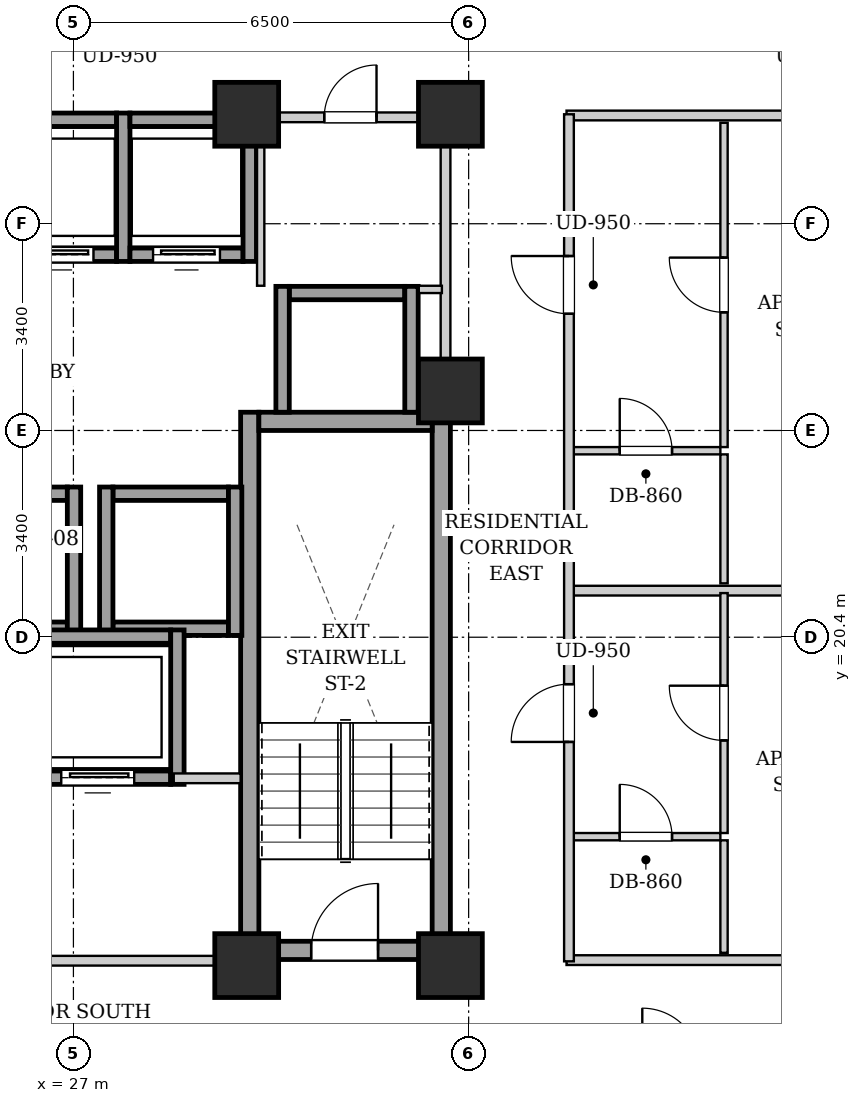
"""IFC4 building model, lengths in metres.
Left out: names, types, materials, properties, quantities, classifications, styles, units other than length and angle.
Written with IfcOpenShell. Run it as: python <this file> out.ifc"""

import sys

from ifc_helpers import new_model, si_unit, direction, frame, frame_2d, origin, origin_2d, place, context, subcontext, project, spatial, rectangle, extrude, element, fill, save


model = new_model("IFC4")
c1 = context("Model", 3, precision=1e-05, world=origin(), true_north=direction((0.0, 1.0)))
c2 = subcontext(c1, "Body", "Model", "MODEL_VIEW")
j1 = project(units=[si_unit("LENGTHUNIT", "METRE"), si_unit("PLANEANGLEUNIT", "RADIAN")], contexts=[c1])
p1 = place(None, origin())
s1 = spatial("IfcSite", under=j1, at=p1, CompositionType="ELEMENT")
p2 = place(p1, origin())
s2 = spatial("IfcBuilding", under=s1, at=p2, CompositionType="ELEMENT")
p3 = place(p2, frame((0.0, 0.0, 103.9)))
s3 = spatial("IfcBuildingStorey", under=s2, at=p3, CompositionType="ELEMENT", Elevation=103.9)
for number, where, z_axis, x_axis in (
    (1, (29.85, 15.0, 0.0), (0.0, 0.0, 1.0), (1.0, 0.0, 0.0)),
    (2, (33.2, 15.0, 0.0), (0.0, 0.0, 1.0), (1.0, 0.0, 0.0)),
    (3, (29.85, 29.0, 0.0), (0.0, 0.0, 1.0), (1.0, 0.0, 0.0)),
    (4, (33.2, 29.0, 0.0), (0.0, 0.0, 1.0), (1.0, 0.0, 0.0)),
    (5, (33.2, 24.45, 0.0), (0.0, 0.0, 1.0), (1.0, 0.0, 0.0)),
):
    element("IfcColumn", number, at=place(p3, frame(where, z_axis=z_axis, x_axis=x_axis)), inside=s3, PredefinedType="COLUMN", context=c2, shape_type="SweptSolid", body=[
        extrude(rectangle(XDim=1.05, YDim=1.05, at=origin_2d()), origin(), (0.0, 0.0, 1.0), 3.2),
    ])
for number, where, z_axis, x_axis in (
    (6, (29.9, 15.1, 0.0), (0.0, 0.0, 1.0), (0.0, 1.0, 0.0)),
    (7, (33.05, 15.1, 0.0), (0.0, 0.0, 1.0), (0.0, 1.0, 0.0)),
):
    element("IfcWall", number, at=place(p3, frame(where, z_axis=z_axis, x_axis=x_axis)), inside=s3, PredefinedType="SHEAR", context=c2, shape_type="SweptSolid", body=[
        extrude(rectangle(XDim=9.0, YDim=0.3, at=frame_2d((4.5, 0.0))), origin(), (0.0, 0.0, 1.0), 2.94),
    ])
p4 = place(p3, frame((30.05, 23.95, 0.0), z_axis=(0.0, 0.0, 1.0), x_axis=(1.0, 0.0, 0.0)))
e8 = element("IfcWall", 8, at=p4, inside=s3, PredefinedType="SHEAR", context=c2, shape_type="SweptSolid", body=[
    extrude(rectangle(XDim=2.85, YDim=0.3, at=frame_2d((1.425, 0.0))), origin(), (0.0, 0.0, 1.0), 2.94),
])
p5 = place(p3, frame((30.05, 15.25, 0.0), z_axis=(0.0, 0.0, 1.0), x_axis=(1.0, 0.0, 0.0)))
e9 = element("IfcWall", 9, at=p5, inside=s3, PredefinedType="SHEAR", context=c2, shape_type="SweptSolid", body=[
    extrude(rectangle(XDim=2.85, YDim=0.3, at=frame_2d((1.425, 0.0))), origin(), (0.0, 0.0, 1.0), 2.94),
])
p6 = place(p5, frame((0.86, 0.0, 0.0)))
e10 = element("IfcOpeningElement", 10, at=p6, cuts=e9, PredefinedType="OPENING", context=c2, shape_type="SweptSolid", body=[
    extrude(rectangle(XDim=1.1, YDim=2.05, at=frame_2d((0.55, 1.025))), frame((0.0, 0.16, 0.0), z_axis=(0.0, -1.0, 0.0), x_axis=(1.0, 0.0, 0.0)), (0.0, 0.0, 1.0), 0.32),
])
p7 = place(p3, frame((25.85, 26.69, 0.0), z_axis=(0.0, 0.0, 1.0), x_axis=(1.0, 0.0, 0.0)))
e11 = element("IfcWall", 11, at=p7, inside=s3, PredefinedType="SHEAR", context=c2, shape_type="SweptSolid", body=[
    extrude(rectangle(XDim=1.86, YDim=0.22, at=frame_2d((0.93, 0.0))), origin(), (0.0, 0.0, 1.0), 2.94),
])
p8 = place(p7, frame((0.38, 0.0, 0.0)))
e12 = element("IfcOpeningElement", 12, at=p8, cuts=e11, PredefinedType="OPENING", context=c2, shape_type="SweptSolid", body=[
    extrude(rectangle(XDim=1.1, YDim=2.15, at=frame_2d((0.55, 1.075))), frame((0.0, 0.12, 0.0), z_axis=(0.0, -1.0, 0.0), x_axis=(1.0, 0.0, 0.0)), (0.0, 0.0, 1.0), 0.24),
])
p9 = place(p3, frame((25.85, 28.91, 0.0), z_axis=(0.0, 0.0, 1.0), x_axis=(1.0, 0.0, 0.0)))
e13 = element("IfcWall", 13, at=p9, inside=s3, PredefinedType="SHEAR", context=c2, shape_type="SweptSolid", body=[
    extrude(rectangle(XDim=1.86, YDim=0.22, at=frame_2d((0.93, 0.0))), origin(), (0.0, 0.0, 1.0), 2.94),
])
p10 = place(p3, frame((27.82, 26.58, 0.0), z_axis=(0.0, 0.0, 1.0), x_axis=(0.0, 1.0, 0.0)))
e14 = element("IfcWall", 14, at=p10, inside=s3, PredefinedType="SHEAR", context=c2, shape_type="SweptSolid", body=[
    extrude(rectangle(XDim=2.44, YDim=0.22, at=frame_2d((1.22, 0.0))), origin(), (0.0, 0.0, 1.0), 2.94),
])
p11 = place(p3, frame((27.93, 26.69, 0.0), z_axis=(0.0, 0.0, 1.0), x_axis=(1.0, 0.0, 0.0)))
e15 = element("IfcWall", 15, at=p11, inside=s3, PredefinedType="SHEAR", context=c2, shape_type="SweptSolid", body=[
    extrude(rectangle(XDim=1.86, YDim=0.22, at=frame_2d((0.93, 0.0))), origin(), (0.0, 0.0, 1.0), 2.94),
])
p12 = place(p11, frame((0.38, 0.0, 0.0)))
e16 = element("IfcOpeningElement", 16, at=p12, cuts=e15, PredefinedType="OPENING", context=c2, shape_type="SweptSolid", body=[
    extrude(rectangle(XDim=1.1, YDim=2.15, at=frame_2d((0.55, 1.075))), frame((0.0, 0.12, 0.0), z_axis=(0.0, -1.0, 0.0), x_axis=(1.0, 0.0, 0.0)), (0.0, 0.0, 1.0), 0.24),
])
p13 = place(p3, frame((27.93, 28.91, 0.0), z_axis=(0.0, 0.0, 1.0), x_axis=(1.0, 0.0, 0.0)))
e17 = element("IfcWall", 17, at=p13, inside=s3, PredefinedType="SHEAR", context=c2, shape_type="SweptSolid", body=[
    extrude(rectangle(XDim=1.86, YDim=0.22, at=frame_2d((0.93, 0.0))), origin(), (0.0, 0.0, 1.0), 2.94),
])
p14 = place(p3, frame((29.9, 26.58, 0.0), z_axis=(0.0, 0.0, 1.0), x_axis=(0.0, 1.0, 0.0)))
e18 = element("IfcWall", 18, at=p14, inside=s3, PredefinedType="SHEAR", context=c2, shape_type="SweptSolid", body=[
    extrude(rectangle(XDim=2.44, YDim=0.22, at=frame_2d((1.22, 0.0))), origin(), (0.0, 0.0, 1.0), 2.94),
])
for number, where, z_axis, x_axis in (
    (19, (25.0, 20.54, 0.0), (0.0, 0.0, 1.0), (1.0, 0.0, 0.0)),
    (20, (25.0, 22.76, 0.0), (0.0, 0.0, 1.0), (1.0, 0.0, 0.0)),
):
    element("IfcWall", number, at=place(p3, frame(where, z_axis=z_axis, x_axis=x_axis)), inside=s3, PredefinedType="SHEAR", context=c2, shape_type="SweptSolid", body=[
        extrude(rectangle(XDim=1.9, YDim=0.22, at=frame_2d((0.95, 0.0))), origin(), (0.0, 0.0, 1.0), 2.94),
    ])
p15 = place(p3, frame((27.01, 20.43, 0.0), z_axis=(0.0, 0.0, 1.0), x_axis=(0.0, 1.0, 0.0)))
e21 = element("IfcWall", 21, at=p15, inside=s3, PredefinedType="SHEAR", context=c2, shape_type="SweptSolid", body=[
    extrude(rectangle(XDim=2.44, YDim=0.22, at=frame_2d((1.22, 0.0))), origin(), (0.0, 0.0, 1.0), 2.94),
])
for number, where, z_axis, x_axis in (
    (22, (27.65, 20.54, 0.0), (0.0, 0.0, 1.0), (1.0, 0.0, 0.0)),
    (23, (27.65, 22.76, 0.0), (0.0, 0.0, 1.0), (1.0, 0.0, 0.0)),
):
    element("IfcWall", number, at=place(p3, frame(where, z_axis=z_axis, x_axis=x_axis)), inside=s3, PredefinedType="SHEAR", context=c2, shape_type="SweptSolid", body=[
        extrude(rectangle(XDim=1.9, YDim=0.22, at=frame_2d((0.95, 0.0))), origin(), (0.0, 0.0, 1.0), 2.94),
    ])
for number, where, z_axis, x_axis in (
    (24, (27.54, 20.43, 0.0), (0.0, 0.0, 1.0), (0.0, 1.0, 0.0)),
    (25, (29.66, 20.43, 0.0), (0.0, 0.0, 1.0), (0.0, 1.0, 0.0)),
):
    element("IfcWall", number, at=place(p3, frame(where, z_axis=z_axis, x_axis=x_axis)), inside=s3, PredefinedType="SHEAR", context=c2, shape_type="SweptSolid", body=[
        extrude(rectangle(XDim=2.44, YDim=0.22, at=frame_2d((1.22, 0.0))), origin(), (0.0, 0.0, 1.0), 2.94),
    ])
p16 = place(p3, frame((30.55, 26.06, 0.0), z_axis=(0.0, 0.0, 1.0), x_axis=(1.0, 0.0, 0.0)))
e26 = element("IfcWall", 26, at=p16, inside=s3, PredefinedType="SHEAR", context=c2, shape_type="SweptSolid", body=[
    extrude(rectangle(XDim=1.9, YDim=0.22, at=frame_2d((0.95, 0.0))), origin(), (0.0, 0.0, 1.0), 2.94),
])
for number, where, z_axis, x_axis in (
    (27, (30.44, 24.1, 0.0), (0.0, 0.0, 1.0), (0.0, 1.0, 0.0)),
    (28, (32.56, 24.1, 0.0), (0.0, 0.0, 1.0), (0.0, 1.0, 0.0)),
):
    element("IfcWall", number, at=place(p3, frame(where, z_axis=z_axis, x_axis=x_axis)), inside=s3, PredefinedType="SHEAR", context=c2, shape_type="SweptSolid", body=[
        extrude(rectangle(XDim=2.07, YDim=0.22, at=frame_2d((1.035, 0.0))), origin(), (0.0, 0.0, 1.0), 2.94),
    ])
p17 = place(p3, frame((26.2, 18.09, 0.0), z_axis=(0.0, 0.0, 1.0), x_axis=(1.0, 0.0, 0.0)))
e29 = element("IfcWall", 29, at=p17, inside=s3, PredefinedType="SHEAR", context=c2, shape_type="SweptSolid", body=[
    extrude(rectangle(XDim=2.4, YDim=0.22, at=frame_2d((1.2, 0.0))), origin(), (0.0, 0.0, 1.0), 2.94),
])
p18 = place(p17, frame((0.6, 0.0, 0.0)))
e30 = element("IfcOpeningElement", 30, at=p18, cuts=e29, PredefinedType="OPENING", context=c2, shape_type="SweptSolid", body=[
    extrude(rectangle(XDim=1.2, YDim=2.15, at=frame_2d((0.6, 1.075))), frame((0.0, 0.12, 0.0), z_axis=(0.0, -1.0, 0.0), x_axis=(1.0, 0.0, 0.0)), (0.0, 0.0, 1.0), 0.24),
])
p19 = place(p3, frame((26.2, 20.41, 0.0), z_axis=(0.0, 0.0, 1.0), x_axis=(1.0, 0.0, 0.0)))
e31 = element("IfcWall", 31, at=p19, inside=s3, PredefinedType="SHEAR", context=c2, shape_type="SweptSolid", body=[
    extrude(rectangle(XDim=2.4, YDim=0.22, at=frame_2d((1.2, 0.0))), origin(), (0.0, 0.0, 1.0), 2.94),
])
p20 = place(p3, frame((28.71, 17.98, 0.0), z_axis=(0.0, 0.0, 1.0), x_axis=(0.0, 1.0, 0.0)))
e32 = element("IfcWall", 32, at=p20, inside=s3, PredefinedType="SHEAR", context=c2, shape_type="SweptSolid", body=[
    extrude(rectangle(XDim=2.54, YDim=0.22, at=frame_2d((1.27, 0.0))), origin(), (0.0, 0.0, 1.0), 2.94),
])
p21 = place(p3, frame((21.25, 15.08, 0.0), z_axis=(0.0, 0.0, 1.0), x_axis=(1.0, 0.0, 0.0)))
e33 = element("IfcWall", 33, at=p21, inside=s3, PredefinedType="PARTITIONING", context=c2, shape_type="SweptSolid", body=[
    extrude(rectangle(XDim=8.5, YDim=0.16, at=frame_2d((4.25, 0.0))), origin(), (0.0, 0.0, 1.0), 2.313),
])
p22 = place(p21, frame((3.725, 0.0, 0.0)))
e34 = element("IfcOpeningElement", 34, at=p22, cuts=e33, PredefinedType="OPENING", context=c2, shape_type="SweptSolid", body=[
    extrude(rectangle(XDim=1.05, YDim=2.05, at=frame_2d((0.525, 1.025))), frame((0.0, 0.09, 0.0), z_axis=(0.0, -1.0, 0.0), x_axis=(1.0, 0.0, 0.0)), (0.0, 0.0, 1.0), 0.18),
])
p23 = place(p3, frame((28.65, 18.08, 0.0), z_axis=(0.0, 0.0, 1.0), x_axis=(1.0, 0.0, 0.0)))
e35 = element("IfcWall", 35, at=p23, inside=s3, PredefinedType="PARTITIONING", context=c2, shape_type="SweptSolid", body=[
    extrude(rectangle(XDim=1.1, YDim=0.16, at=frame_2d((0.55, 0.0))), origin(), (0.0, 0.0, 1.0), 2.94),
])
p24 = place(p3, frame((33.12, 24.12, 0.0), z_axis=(0.0, 0.0, 1.0), x_axis=(0.0, 1.0, 0.0)))
e36 = element("IfcWall", 36, at=p24, inside=s3, PredefinedType="PARTITIONING", context=c2, shape_type="SweptSolid", body=[
    extrude(rectangle(XDim=4.76, YDim=0.16, at=frame_2d((2.38, 0.0))), origin(), (0.0, 0.0, 1.0), 2.94),
])
p25 = place(p3, frame((30.08, 26.18, 0.0), z_axis=(0.0, 0.0, 1.0), x_axis=(0.0, 1.0, 0.0)))
e37 = element("IfcWall", 37, at=p25, inside=s3, PredefinedType="PARTITIONING", context=c2, shape_type="SweptSolid", body=[
    extrude(rectangle(XDim=2.68, YDim=0.12, at=frame_2d((1.34, 0.0))), origin(), (0.0, 0.0, 1.0), 2.94),
])
p26 = place(p3, frame((32.68, 26.12, 0.0), z_axis=(0.0, 0.0, 1.0), x_axis=(1.0, 0.0, 0.0)))
e38 = element("IfcWall", 38, at=p26, inside=s3, PredefinedType="PARTITIONING", context=c2, shape_type="SweptSolid", body=[
    extrude(rectangle(XDim=0.38, YDim=0.12, at=frame_2d((0.19, 0.0))), origin(), (0.0, 0.0, 1.0), 2.94),
])
p27 = place(p3, frame((30.08, 28.95, 0.0), z_axis=(0.0, 0.0, 1.0), x_axis=(1.0, 0.0, 0.0)))
e39 = element("IfcWall", 39, at=p27, inside=s3, PredefinedType="PARTITIONING", context=c2, shape_type="SweptSolid", body=[
    extrude(rectangle(XDim=2.96, YDim=0.16, at=frame_2d((1.48, 0.0))), origin(), (0.0, 0.0, 1.0), 2.94),
])
p28 = place(p27, frame((1.045, 0.0, 0.0)))
e40 = element("IfcOpeningElement", 40, at=p28, cuts=e39, PredefinedType="OPENING", context=c2, shape_type="SweptSolid", body=[
    extrude(rectangle(XDim=0.86, YDim=2.05, at=frame_2d((0.43, 1.025))), frame((0.0, 0.09, 0.0), z_axis=(0.0, -1.0, 0.0), x_axis=(1.0, 0.0, 0.0)), (0.0, 0.0, 1.0), 0.18),
])
for number, where, z_axis, x_axis in (
    (41, (35.11, 15.09, 0.0), (0.0, 0.0, 1.0), (1.0, 0.0, 0.0)),
    (42, (35.11, 28.98, 0.0), (0.0, 0.0, 1.0), (1.0, 0.0, 0.0)),
):
    element("IfcWall", number, at=place(p3, frame(where, z_axis=z_axis, x_axis=x_axis)), inside=s3, PredefinedType="PARTITIONING", context=c2, shape_type="SweptSolid", body=[
        extrude(rectangle(XDim=8.01, YDim=0.16, at=frame_2d((4.005, 0.0))), origin(), (0.0, 0.0, 1.0), 2.313),
    ])
p29 = place(p3, frame((35.19, 21.166, 0.0), z_axis=(0.0, 0.0, 1.0), x_axis=(1.0, 0.0, 0.0)))
e43 = element("IfcWall", 43, at=p29, inside=s3, PredefinedType="PARTITIONING", context=c2, shape_type="SweptSolid", body=[
    extrude(rectangle(XDim=7.93, YDim=0.16, at=frame_2d((3.965, 0.0))), origin(), (0.0, 0.0, 1.0), 2.94),
])
p30 = place(p3, frame((35.19, 17.12, 0.0), z_axis=(0.0, 0.0, 1.0), x_axis=(1.0, 0.0, 0.0)))
e44 = element("IfcWall", 44, at=p30, inside=s3, PredefinedType="PARTITIONING", context=c2, shape_type="SweptSolid", body=[
    extrude(rectangle(XDim=2.45, YDim=0.12, at=frame_2d((1.225, 0.0))), origin(), (0.0, 0.0, 1.0), 2.94),
])
p31 = place(p30, frame((0.795, 0.0, 0.0)))
e45 = element("IfcOpeningElement", 45, at=p31, cuts=e44, PredefinedType="OPENING", context=c2, shape_type="SweptSolid", body=[
    extrude(rectangle(XDim=0.86, YDim=2.05, at=frame_2d((0.43, 1.025))), frame((0.0, 0.07, 0.0), z_axis=(0.0, -1.0, 0.0), x_axis=(1.0, 0.0, 0.0)), (0.0, 0.0, 1.0), 0.14),
])
p32 = place(p3, frame((37.7, 15.21, 0.0), z_axis=(0.0, 0.0, 1.0), x_axis=(0.0, 1.0, 0.0)))
e46 = element("IfcWall", 46, at=p32, inside=s3, PredefinedType="PARTITIONING", context=c2, shape_type="SweptSolid", body=[
    extrude(rectangle(XDim=1.85, YDim=0.12, at=frame_2d((0.925, 0.0))), origin(), (0.0, 0.0, 1.0), 2.94),
])
p33 = place(p3, frame((37.7, 17.18, 0.0), z_axis=(0.0, 0.0, 1.0), x_axis=(0.0, 1.0, 0.0)))
e47 = element("IfcWall", 47, at=p33, inside=s3, PredefinedType="PARTITIONING", context=c2, shape_type="SweptSolid", body=[
    extrude(rectangle(XDim=3.946, YDim=0.12, at=frame_2d((1.973, 0.0))), origin(), (0.0, 0.0, 1.0), 2.94),
])
p34 = place(p33, frame((1.523, 0.0, 0.0)))
e48 = element("IfcOpeningElement", 48, at=p34, cuts=e47, PredefinedType="OPENING", context=c2, shape_type="SweptSolid", body=[
    extrude(rectangle(XDim=0.9, YDim=2.05, at=frame_2d((0.45, 1.025))), frame((0.0, 0.07, 0.0), z_axis=(0.0, -1.0, 0.0), x_axis=(1.0, 0.0, 0.0)), (0.0, 0.0, 1.0), 0.14),
])
p35 = place(p3, frame((35.19, 23.467, 0.0), z_axis=(0.0, 0.0, 1.0), x_axis=(1.0, 0.0, 0.0)))
e49 = element("IfcWall", 49, at=p35, inside=s3, PredefinedType="PARTITIONING", context=c2, shape_type="SweptSolid", body=[
    extrude(rectangle(XDim=2.45, YDim=0.12, at=frame_2d((1.225, 0.0))), origin(), (0.0, 0.0, 1.0), 2.94),
])
p36 = place(p35, frame((0.795, 0.0, 0.0)))
e50 = element("IfcOpeningElement", 50, at=p36, cuts=e49, PredefinedType="OPENING", context=c2, shape_type="SweptSolid", body=[
    extrude(rectangle(XDim=0.86, YDim=2.05, at=frame_2d((0.43, 1.025))), frame((0.0, 0.07, 0.0), z_axis=(0.0, -1.0, 0.0), x_axis=(1.0, 0.0, 0.0)), (0.0, 0.0, 1.0), 0.14),
])
p37 = place(p3, frame((37.7, 21.286, 0.0), z_axis=(0.0, 0.0, 1.0), x_axis=(0.0, 1.0, 0.0)))
e51 = element("IfcWall", 51, at=p37, inside=s3, PredefinedType="PARTITIONING", context=c2, shape_type="SweptSolid", body=[
    extrude(rectangle(XDim=2.121, YDim=0.12, at=frame_2d((1.061, 0.0))), origin(), (0.0, 0.0, 1.0), 2.94),
])
p38 = place(p3, frame((37.7, 23.527, 0.0), z_axis=(0.0, 0.0, 1.0), x_axis=(0.0, 1.0, 0.0)))
e52 = element("IfcWall", 52, at=p38, inside=s3, PredefinedType="PARTITIONING", context=c2, shape_type="SweptSolid", body=[
    extrude(rectangle(XDim=5.333, YDim=0.12, at=frame_2d((2.667, 0.0))), origin(), (0.0, 0.0, 1.0), 2.94),
])
p39 = place(p38, frame((2.216, 0.0, 0.0)))
e53 = element("IfcOpeningElement", 53, at=p39, cuts=e52, PredefinedType="OPENING", context=c2, shape_type="SweptSolid", body=[
    extrude(rectangle(XDim=0.9, YDim=2.05, at=frame_2d((0.45, 1.025))), frame((0.0, 0.07, 0.0), z_axis=(0.0, -1.0, 0.0), x_axis=(1.0, 0.0, 0.0)), (0.0, 0.0, 1.0), 0.14),
])
p40 = place(p3, frame((35.15, 15.07, 0.0), z_axis=(0.0, 0.0, 1.0), x_axis=(0.0, 1.0, 0.0)))
e54 = element("IfcWall", 54, at=p40, inside=s3, PredefinedType="PARTITIONING", context=c2, shape_type="SweptSolid", body=[
    extrude(rectangle(XDim=13.93, YDim=0.16, at=frame_2d((6.965, 0.0))), origin(), (0.0, 0.0, 1.0), 2.94),
])
p41 = place(p40, frame((3.608, 0.0, 0.0)))
e55 = element("IfcOpeningElement", 55, at=p41, cuts=e54, PredefinedType="OPENING", context=c2, shape_type="SweptSolid", body=[
    extrude(rectangle(XDim=0.95, YDim=2.1, at=frame_2d((0.475, 1.05))), frame((0.0, 0.09, 0.0), z_axis=(0.0, -1.0, 0.0), x_axis=(1.0, 0.0, 0.0)), (0.0, 0.0, 1.0), 0.18),
])
p42 = place(p40, frame((10.649, 0.0, 0.0)))
e56 = element("IfcOpeningElement", 56, at=p42, cuts=e54, PredefinedType="OPENING", context=c2, shape_type="SweptSolid", body=[
    extrude(rectangle(XDim=0.95, YDim=2.1, at=frame_2d((0.475, 1.05))), frame((0.0, 0.09, 0.0), z_axis=(0.0, -1.0, 0.0), x_axis=(1.0, 0.0, 0.0)), (0.0, 0.0, 1.0), 0.18),
])
p43 = place(p6, origin())
e57 = element("IfcDoor", 57, at=p43, inside=s3, OperationType="SINGLE_SWING_RIGHT", PredefinedType="DOOR", context=c2, shape_type="SweptSolid", body=[
    extrude(rectangle(XDim=1.1, YDim=2.05, at=frame_2d((0.55, 1.025))), frame((0.0, 0.025, 0.0), z_axis=(0.0, -1.0, 0.0), x_axis=(1.0, 0.0, 0.0)), (0.0, 0.0, 1.0), 0.05),
])
fill(e10, e57)
p44 = place(p8, origin())
e58 = element("IfcDoor", 58, at=p44, inside=s3, OperationType="SLIDING_TO_LEFT", PredefinedType="DOOR", context=c2, shape_type="SweptSolid", body=[
    extrude(rectangle(XDim=1.1, YDim=2.15, at=frame_2d((0.55, 1.075))), frame((0.0, 0.025, 0.0), z_axis=(0.0, -1.0, 0.0), x_axis=(1.0, 0.0, 0.0)), (0.0, 0.0, 1.0), 0.05),
])
fill(e12, e58)
p45 = place(p12, origin())
e59 = element("IfcDoor", 59, at=p45, inside=s3, OperationType="SLIDING_TO_LEFT", PredefinedType="DOOR", context=c2, shape_type="SweptSolid", body=[
    extrude(rectangle(XDim=1.1, YDim=2.15, at=frame_2d((0.55, 1.075))), frame((0.0, 0.025, 0.0), z_axis=(0.0, -1.0, 0.0), x_axis=(1.0, 0.0, 0.0)), (0.0, 0.0, 1.0), 0.05),
])
fill(e16, e59)
p46 = place(p18, origin())
e60 = element("IfcDoor", 60, at=p46, inside=s3, OperationType="SLIDING_TO_LEFT", PredefinedType="DOOR", context=c2, shape_type="SweptSolid", body=[
    extrude(rectangle(XDim=1.2, YDim=2.15, at=frame_2d((0.6, 1.075))), frame((0.0, 0.025, 0.0), z_axis=(0.0, -1.0, 0.0), x_axis=(1.0, 0.0, 0.0)), (0.0, 0.0, 1.0), 0.05),
])
fill(e30, e60)
p47 = place(p28, origin())
e61 = element("IfcDoor", 61, at=p47, inside=s3, OperationType="SINGLE_SWING_RIGHT", PredefinedType="DOOR", context=c2, shape_type="SweptSolid", body=[
    extrude(rectangle(XDim=0.86, YDim=2.05, at=frame_2d((0.43, 1.025))), frame((0.0, 0.025, 0.0), z_axis=(0.0, -1.0, 0.0), x_axis=(1.0, 0.0, 0.0)), (0.0, 0.0, 1.0), 0.05),
])
fill(e40, e61)
p48 = place(p31, origin())
e62 = element("IfcDoor", 62, at=p48, inside=s3, OperationType="SINGLE_SWING_LEFT", PredefinedType="DOOR", context=c2, shape_type="SweptSolid", body=[
    extrude(rectangle(XDim=0.86, YDim=2.05, at=frame_2d((0.43, 1.025))), frame((0.0, 0.025, 0.0), z_axis=(0.0, -1.0, 0.0), x_axis=(1.0, 0.0, 0.0)), (0.0, 0.0, 1.0), 0.05),
])
fill(e45, e62)
p49 = place(p34, origin())
e63 = element("IfcDoor", 63, at=p49, inside=s3, OperationType="SINGLE_SWING_RIGHT", PredefinedType="DOOR", context=c2, shape_type="SweptSolid", body=[
    extrude(rectangle(XDim=0.9, YDim=2.05, at=frame_2d((0.45, 1.025))), frame((0.0, 0.025, 0.0), z_axis=(0.0, -1.0, 0.0), x_axis=(1.0, 0.0, 0.0)), (0.0, 0.0, 1.0), 0.05),
])
fill(e48, e63)
p50 = place(p36, origin())
e64 = element("IfcDoor", 64, at=p50, inside=s3, OperationType="SINGLE_SWING_LEFT", PredefinedType="DOOR", context=c2, shape_type="SweptSolid", body=[
    extrude(rectangle(XDim=0.86, YDim=2.05, at=frame_2d((0.43, 1.025))), frame((0.0, 0.025, 0.0), z_axis=(0.0, -1.0, 0.0), x_axis=(1.0, 0.0, 0.0)), (0.0, 0.0, 1.0), 0.05),
])
fill(e50, e64)
p51 = place(p39, origin())
e65 = element("IfcDoor", 65, at=p51, inside=s3, OperationType="SINGLE_SWING_RIGHT", PredefinedType="DOOR", context=c2, shape_type="SweptSolid", body=[
    extrude(rectangle(XDim=0.9, YDim=2.05, at=frame_2d((0.45, 1.025))), frame((0.0, 0.025, 0.0), z_axis=(0.0, -1.0, 0.0), x_axis=(1.0, 0.0, 0.0)), (0.0, 0.0, 1.0), 0.05),
])
fill(e53, e65)
p52 = place(p41, origin())
e66 = element("IfcDoor", 66, at=p52, inside=s3, OperationType="SINGLE_SWING_LEFT", PredefinedType="DOOR", context=c2, shape_type="SweptSolid", body=[
    extrude(rectangle(XDim=0.95, YDim=2.1, at=frame_2d((0.475, 1.05))), frame((0.0, 0.025, 0.0), z_axis=(0.0, -1.0, 0.0), x_axis=(1.0, 0.0, 0.0)), (0.0, 0.0, 1.0), 0.05),
])
fill(e55, e66)
p53 = place(p42, origin())
e67 = element("IfcDoor", 67, at=p53, inside=s3, OperationType="SINGLE_SWING_RIGHT", PredefinedType="DOOR", context=c2, shape_type="SweptSolid", body=[
    extrude(rectangle(XDim=0.95, YDim=2.1, at=frame_2d((0.475, 1.05))), frame((0.0, 0.025, 0.0), z_axis=(0.0, -1.0, 0.0), x_axis=(1.0, 0.0, 0.0)), (0.0, 0.0, 1.0), 0.05),
])
fill(e56, e67)
save(model, sys.argv[1])
